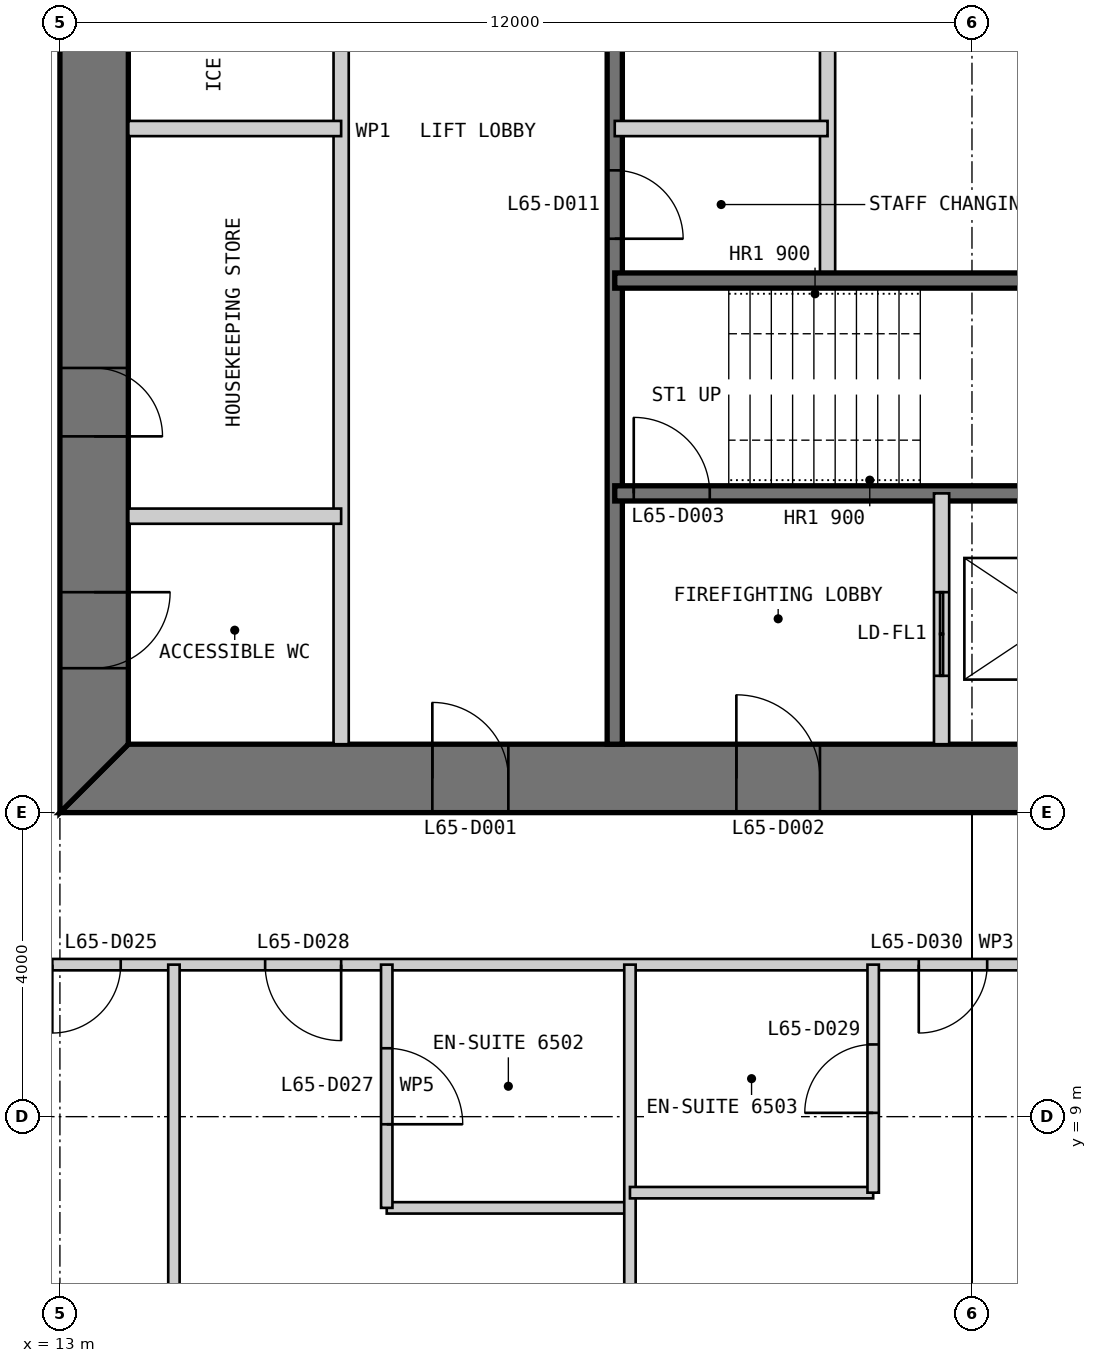
"""IFC4 building model, lengths in metres.
Left out: names, types, materials, properties, quantities, classifications, styles, units other than length and angle.
Written with IfcOpenShell. Run it as: python <this file> out.ifc"""

import sys

from ifc_helpers import new_model, si_unit, direction, frame, frame_2d, origin, place, context, subcontext, project, spatial, polyline, rectangle, outline, extrude, element, fill, save


model = new_model("IFC4")
c1 = context("Model", 3, precision=1e-05, world=origin(), true_north=direction((0.0, 1.0)))
c2 = subcontext(c1, "Body", "Model", "MODEL_VIEW")
j1 = project(units=[si_unit("LENGTHUNIT", "METRE"), si_unit("PLANEANGLEUNIT", "RADIAN")], contexts=[c1])
p1 = place(None, origin())
s1 = spatial("IfcSite", under=j1, at=p1, CompositionType="ELEMENT")
p2 = place(p1, origin())
s2 = spatial("IfcBuilding", under=s1, at=p2, CompositionType="ELEMENT")
p3 = place(p2, frame((0.0, 0.0, 273.0)))
s3 = spatial("IfcBuildingStorey", under=s2, at=p3, CompositionType="ELEMENT", Elevation=273.0)
p4 = place(p3, frame((13.0, 13.45, 0.0), z_axis=(0.0, 0.0, 1.0), x_axis=(1.0, 0.0, 0.0)))
e1 = element("IfcWall", 1, at=p4, inside=s3, PredefinedType="SHEAR", context=c2, shape_type="SweptSolid", body=[
    extrude(outline(polyline([(0.0, -0.45), (24.0, -0.45), (23.1, 0.45), (0.9, 0.45), (0.0, -0.45)])), origin(), (0.0, 0.0, 1.0), 3.4),
])
p5 = place(p4, frame((4.9, 0.0, 0.0)))
e2 = element("IfcOpeningElement", 2, at=p5, cuts=e1, PredefinedType="OPENING", context=c2, shape_type="SweptSolid", body=[
    extrude(rectangle(XDim=1.0, YDim=2.2, at=frame_2d((0.5, 1.1))), frame((0.0, 0.46, 0.0), z_axis=(0.0, -1.0, 0.0), x_axis=(1.0, 0.0, 0.0)), (0.0, 0.0, 1.0), 0.92),
])
p6 = place(p4, frame((8.9, 0.0, 0.0)))
e3 = element("IfcOpeningElement", 3, at=p6, cuts=e1, PredefinedType="OPENING", context=c2, shape_type="SweptSolid", body=[
    extrude(rectangle(XDim=1.1, YDim=2.2, at=frame_2d((0.55, 1.1))), frame((0.0, 0.46, 0.0), z_axis=(0.0, -1.0, 0.0), x_axis=(1.0, 0.0, 0.0)), (0.0, 0.0, 1.0), 0.92),
])
p7 = place(p4, frame((15.05, 0.0, 0.0)))
e4 = element("IfcOpeningElement", 4, at=p7, cuts=e1, PredefinedType="OPENING", context=c2, shape_type="SweptSolid", body=[
    extrude(rectangle(XDim=0.9, YDim=2.2, at=frame_2d((0.45, 1.1))), frame((0.0, 0.46, 0.0), z_axis=(0.0, -1.0, 0.0), x_axis=(1.0, 0.0, 0.0)), (0.0, 0.0, 1.0), 0.92),
])
p8 = place(p4, frame((17.9, 0.0, 0.0)))
e5 = element("IfcOpeningElement", 5, at=p8, cuts=e1, PredefinedType="OPENING", context=c2, shape_type="SweptSolid", body=[
    extrude(rectangle(XDim=1.0, YDim=2.2, at=frame_2d((0.5, 1.1))), frame((0.0, 0.46, 0.0), z_axis=(0.0, -1.0, 0.0), x_axis=(1.0, 0.0, 0.0)), (0.0, 0.0, 1.0), 0.92),
])
p9 = place(p4, frame((21.4, 0.0, 0.0)))
e6 = element("IfcOpeningElement", 6, at=p9, cuts=e1, PredefinedType="OPENING", context=c2, shape_type="SweptSolid", body=[
    extrude(rectangle(XDim=1.0, YDim=2.2, at=frame_2d((0.5, 1.1))), frame((0.0, 0.46, 0.0), z_axis=(0.0, -1.0, 0.0), x_axis=(1.0, 0.0, 0.0)), (0.0, 0.0, 1.0), 0.92),
])
p10 = place(p3, frame((13.45, 36.1, 0.0), z_axis=(0.0, 0.0, 1.0), x_axis=(0.0, -1.0, 0.0)))
e7 = element("IfcWall", 7, at=p10, inside=s3, PredefinedType="SHEAR", context=c2, shape_type="SweptSolid", body=[
    extrude(outline(polyline([(-0.9, -0.45), (23.1, -0.45), (22.2, 0.45), (0.0, 0.45), (-0.9, -0.45)])), origin(), (0.0, 0.0, 1.0), 3.4),
])
p11 = place(p10, frame((20.2, 0.0, 0.0)))
e8 = element("IfcOpeningElement", 8, at=p11, cuts=e7, PredefinedType="OPENING", context=c2, shape_type="SweptSolid", body=[
    extrude(rectangle(XDim=1.0, YDim=2.2, at=frame_2d((0.5, 1.1))), frame((0.0, 0.46, 0.0), z_axis=(0.0, -1.0, 0.0), x_axis=(1.0, 0.0, 0.0)), (0.0, 0.0, 1.0), 0.92),
])
p12 = place(p10, frame((17.25, 0.0, 0.0)))
e9 = element("IfcOpeningElement", 9, at=p12, cuts=e7, PredefinedType="OPENING", context=c2, shape_type="SweptSolid", body=[
    extrude(rectangle(XDim=0.9, YDim=2.2, at=frame_2d((0.45, 1.1))), frame((0.0, 0.46, 0.0), z_axis=(0.0, -1.0, 0.0), x_axis=(1.0, 0.0, 0.0)), (0.0, 0.0, 1.0), 0.92),
])
p13 = place(p3, frame((16.7, 13.9, 0.0), z_axis=(0.0, 0.0, 1.0), x_axis=(0.0, 1.0, 0.0)))
e10 = element("IfcWall", 10, at=p13, inside=s3, PredefinedType="PARTITIONING", context=c2, shape_type="SweptSolid", body=[
    extrude(rectangle(XDim=16.1, YDim=0.2, at=frame_2d((8.05, 0.0))), origin(), (0.0, 0.0, 1.0), 3.2),
])
p14 = place(p13, frame((9.65, 0.0, 0.0)))
e11 = element("IfcOpeningElement", 11, at=p14, cuts=e10, PredefinedType="OPENING", context=c2, shape_type="SweptSolid", body=[
    extrude(rectangle(XDim=0.9, YDim=2.2, at=frame_2d((0.45, 1.1))), frame((0.0, 0.11, 0.0), z_axis=(0.0, -1.0, 0.0), x_axis=(1.0, 0.0, 0.0)), (0.0, 0.0, 1.0), 0.22),
])
p15 = place(p13, frame((13.65, 0.0, 0.0)))
e12 = element("IfcOpeningElement", 12, at=p15, cuts=e10, PredefinedType="OPENING", context=c2, shape_type="SweptSolid", body=[
    extrude(rectangle(XDim=0.9, YDim=2.2, at=frame_2d((0.45, 1.1))), frame((0.0, 0.11, 0.0), z_axis=(0.0, -1.0, 0.0), x_axis=(1.0, 0.0, 0.0)), (0.0, 0.0, 1.0), 0.22),
])
p16 = place(p3, frame((20.3, 13.9, 0.0), z_axis=(0.0, 0.0, 1.0), x_axis=(0.0, 1.0, 0.0)))
e13 = element("IfcWall", 13, at=p16, inside=s3, PredefinedType="SOLIDWALL", context=c2, shape_type="SweptSolid", body=[
    extrude(rectangle(XDim=16.1, YDim=0.2, at=frame_2d((8.05, 0.0))), origin(), (0.0, 0.0, 1.0), 3.2),
])
p17 = place(p16, frame((6.65, 0.0, 0.0)))
e14 = element("IfcOpeningElement", 14, at=p17, cuts=e13, PredefinedType="OPENING", context=c2, shape_type="SweptSolid", body=[
    extrude(rectangle(XDim=0.9, YDim=2.2, at=frame_2d((0.45, 1.1))), frame((0.0, 0.11, 0.0), z_axis=(0.0, -1.0, 0.0), x_axis=(1.0, 0.0, 0.0)), (0.0, 0.0, 1.0), 0.22),
])
p18 = place(p16, frame((9.15, 0.0, 0.0)))
e15 = element("IfcOpeningElement", 15, at=p18, cuts=e13, PredefinedType="OPENING", context=c2, shape_type="SweptSolid", body=[
    extrude(rectangle(XDim=0.9, YDim=2.2, at=frame_2d((0.45, 1.1))), frame((0.0, 0.11, 0.0), z_axis=(0.0, -1.0, 0.0), x_axis=(1.0, 0.0, 0.0)), (0.0, 0.0, 1.0), 0.22),
])
p19 = place(p16, frame((13.15, 0.0, 0.0)))
e16 = element("IfcOpeningElement", 16, at=p19, cuts=e13, PredefinedType="OPENING", context=c2, shape_type="SweptSolid", body=[
    extrude(rectangle(XDim=0.9, YDim=2.2, at=frame_2d((0.45, 1.1))), frame((0.0, 0.11, 0.0), z_axis=(0.0, -1.0, 0.0), x_axis=(1.0, 0.0, 0.0)), (0.0, 0.0, 1.0), 0.22),
])
p20 = place(p3, frame((23.1, 20.0, 0.0), z_axis=(0.0, 0.0, 1.0), x_axis=(0.0, 1.0, 0.0)))
e17 = element("IfcWall", 17, at=p20, inside=s3, PredefinedType="PARTITIONING", context=c2, shape_type="SweptSolid", body=[
    extrude(rectangle(XDim=10.0, YDim=0.2, at=frame_2d((5.0, 0.0))), origin(), (0.0, 0.0, 1.0), 3.2),
])
p21 = place(p3, frame((20.3, 17.2, 0.0), z_axis=(0.0, 0.0, 1.0), x_axis=(1.0, 0.0, 0.0)))
e18 = element("IfcWall", 18, at=p21, inside=s3, PredefinedType="SOLIDWALL", context=c2, shape_type="SweptSolid", body=[
    extrude(rectangle(XDim=9.4, YDim=0.2, at=frame_2d((4.7, 0.0))), origin(), (0.0, 0.0, 1.0), 3.2),
])
p22 = place(p21, frame((0.25, 0.0, 0.0)))
e19 = element("IfcOpeningElement", 19, at=p22, cuts=e18, PredefinedType="OPENING", context=c2, shape_type="SweptSolid", body=[
    extrude(rectangle(XDim=1.0, YDim=2.2, at=frame_2d((0.5, 1.1))), frame((0.0, 0.11, 0.0), z_axis=(0.0, -1.0, 0.0), x_axis=(1.0, 0.0, 0.0)), (0.0, 0.0, 1.0), 0.22),
])
p23 = place(p3, frame((20.3, 20.0, 0.0), z_axis=(0.0, 0.0, 1.0), x_axis=(1.0, 0.0, 0.0)))
e20 = element("IfcWall", 20, at=p23, inside=s3, PredefinedType="SOLIDWALL", context=c2, shape_type="SweptSolid", body=[
    extrude(rectangle(XDim=15.8, YDim=0.2, at=frame_2d((7.9, 0.0))), origin(), (0.0, 0.0, 1.0), 3.2),
])
p24 = place(p3, frame((24.6, 13.9, 0.0), z_axis=(0.0, 0.0, 1.0), x_axis=(0.0, 1.0, 0.0)))
e21 = element("IfcWall", 21, at=p24, inside=s3, PredefinedType="PARTITIONING", context=c2, shape_type="SweptSolid", body=[
    extrude(rectangle(XDim=3.3, YDim=0.2, at=frame_2d((1.65, 0.0))), origin(), (0.0, 0.0, 1.0), 3.2),
])
p25 = place(p24, frame((0.9, 0.0, 0.0)))
e22 = element("IfcOpeningElement", 22, at=p25, cuts=e21, PredefinedType="OPENING", context=c2, shape_type="SweptSolid", body=[
    extrude(rectangle(XDim=1.1, YDim=2.2, at=frame_2d((0.55, 1.1))), frame((0.0, 0.11, 0.0), z_axis=(0.0, -1.0, 0.0), x_axis=(1.0, 0.0, 0.0)), (0.0, 0.0, 1.0), 0.22),
])
for number, where, z_axis, x_axis in (
    (23, (13.9, 16.9, 0.0), (0.0, 0.0, 1.0), (1.0, 0.0, 0.0)),
    (24, (13.9, 22.0, 0.0), (0.0, 0.0, 1.0), (1.0, 0.0, 0.0)),
    (25, (20.3, 22.0, 0.0), (0.0, 0.0, 1.0), (1.0, 0.0, 0.0)),
):
    element("IfcWall", number, at=place(p3, frame(where, z_axis=z_axis, x_axis=x_axis)), inside=s3, PredefinedType="PARTITIONING", context=c2, shape_type="SweptSolid", body=[
        extrude(rectangle(XDim=2.8, YDim=0.2, at=frame_2d((1.4, 0.0))), origin(), (0.0, 0.0, 1.0), 3.2),
    ])
p26 = place(p3, frame((11.0, 11.0, 0.0), z_axis=(0.0, 0.0, 1.0), x_axis=(1.0, 0.0, 0.0)))
e26 = element("IfcWall", 26, at=p26, inside=s3, PredefinedType="PARTITIONING", context=c2, shape_type="SweptSolid", body=[
    extrude(rectangle(XDim=28.0, YDim=0.15, at=frame_2d((14.0, 0.0))), origin(), (0.0, 0.0, 1.0), 2.844),
])
p27 = place(p26, frame((1.9, 0.0, 0.0)))
e27 = element("IfcOpeningElement", 27, at=p27, cuts=e26, PredefinedType="OPENING", context=c2, shape_type="SweptSolid", body=[
    extrude(rectangle(XDim=0.9, YDim=2.1, at=frame_2d((0.45, 1.05))), frame((0.0, 0.085, 0.0), z_axis=(0.0, -1.0, 0.0), x_axis=(1.0, 0.0, 0.0)), (0.0, 0.0, 1.0), 0.17),
])
p28 = place(p26, frame((4.7, 0.0, 0.0)))
e28 = element("IfcOpeningElement", 28, at=p28, cuts=e26, PredefinedType="OPENING", context=c2, shape_type="SweptSolid", body=[
    extrude(rectangle(XDim=1.0, YDim=2.1, at=frame_2d((0.5, 1.05))), frame((0.0, 0.085, 0.0), z_axis=(0.0, -1.0, 0.0), x_axis=(1.0, 0.0, 0.0)), (0.0, 0.0, 1.0), 0.17),
])
p29 = place(p26, frame((13.3, 0.0, 0.0)))
e29 = element("IfcOpeningElement", 29, at=p29, cuts=e26, PredefinedType="OPENING", context=c2, shape_type="SweptSolid", body=[
    extrude(rectangle(XDim=0.9, YDim=2.1, at=frame_2d((0.45, 1.05))), frame((0.0, 0.085, 0.0), z_axis=(0.0, -1.0, 0.0), x_axis=(1.0, 0.0, 0.0)), (0.0, 0.0, 1.0), 0.17),
])
p30 = place(p26, frame((24.9, 0.0, 0.0)))
e30 = element("IfcOpeningElement", 30, at=p30, cuts=e26, PredefinedType="OPENING", context=c2, shape_type="SweptSolid", body=[
    extrude(rectangle(XDim=0.9, YDim=2.1, at=frame_2d((0.45, 1.05))), frame((0.0, 0.085, 0.0), z_axis=(0.0, -1.0, 0.0), x_axis=(1.0, 0.0, 0.0)), (0.0, 0.0, 1.0), 0.17),
])
p31 = place(p3, frame((14.5, 0.15, 0.0), z_axis=(0.0, 0.0, 1.0), x_axis=(0.0, 1.0, 0.0)))
e31 = element("IfcWall", 31, at=p31, inside=s3, PredefinedType="PARTITIONING", context=c2, shape_type="SweptSolid", body=[
    extrude(rectangle(XDim=10.85, YDim=0.15, at=frame_2d((5.425, 0.0))), origin(), (0.0, 0.0, 1.0), 3.25),
])
p32 = place(p3, frame((17.3, 7.8, 0.0), z_axis=(0.0, 0.0, 1.0), x_axis=(1.0, 0.0, 0.0)))
e32 = element("IfcWall", 32, at=p32, inside=s3, PredefinedType="PARTITIONING", context=c2, shape_type="SweptSolid", body=[
    extrude(rectangle(XDim=3.2, YDim=0.15, at=frame_2d((1.6, 0.0))), origin(), (0.0, 0.0, 1.0), 3.25),
])
p33 = place(p3, frame((17.3, 7.8, 0.0), z_axis=(0.0, 0.0, 1.0), x_axis=(0.0, 1.0, 0.0)))
e33 = element("IfcWall", 33, at=p33, inside=s3, PredefinedType="PARTITIONING", context=c2, shape_type="SweptSolid", body=[
    extrude(rectangle(XDim=3.2, YDim=0.15, at=frame_2d((1.6, 0.0))), origin(), (0.0, 0.0, 1.0), 3.25),
])
p34 = place(p33, frame((1.1, 0.0, 0.0)))
e34 = element("IfcOpeningElement", 34, at=p34, cuts=e33, PredefinedType="OPENING", context=c2, shape_type="SweptSolid", body=[
    extrude(rectangle(XDim=1.0, YDim=2.1, at=frame_2d((0.5, 1.05))), frame((0.0, 0.085, 0.0), z_axis=(0.0, -1.0, 0.0), x_axis=(1.0, 0.0, 0.0)), (0.0, 0.0, 1.0), 0.17),
])
p35 = place(p3, frame((20.5, 0.15, 0.0), z_axis=(0.0, 0.0, 1.0), x_axis=(0.0, 1.0, 0.0)))
e35 = element("IfcWall", 35, at=p35, inside=s3, PredefinedType="PARTITIONING", context=c2, shape_type="SweptSolid", body=[
    extrude(rectangle(XDim=10.85, YDim=0.15, at=frame_2d((5.425, 0.0))), origin(), (0.0, 0.0, 1.0), 3.25),
])
p36 = place(p3, frame((20.5, 8.0, 0.0), z_axis=(0.0, 0.0, 1.0), x_axis=(1.0, 0.0, 0.0)))
e36 = element("IfcWall", 36, at=p36, inside=s3, PredefinedType="PARTITIONING", context=c2, shape_type="SweptSolid", body=[
    extrude(rectangle(XDim=3.2, YDim=0.15, at=frame_2d((1.6, 0.0))), origin(), (0.0, 0.0, 1.0), 3.25),
])
p37 = place(p3, frame((23.7, 8.0, 0.0), z_axis=(0.0, 0.0, 1.0), x_axis=(0.0, 1.0, 0.0)))
e37 = element("IfcWall", 37, at=p37, inside=s3, PredefinedType="PARTITIONING", context=c2, shape_type="SweptSolid", body=[
    extrude(rectangle(XDim=3.0, YDim=0.15, at=frame_2d((1.5, 0.0))), origin(), (0.0, 0.0, 1.0), 3.25),
])
p38 = place(p37, frame((1.05, 0.0, 0.0)))
e38 = element("IfcOpeningElement", 38, at=p38, cuts=e37, PredefinedType="OPENING", context=c2, shape_type="SweptSolid", body=[
    extrude(rectangle(XDim=0.9, YDim=2.1, at=frame_2d((0.45, 1.05))), frame((0.0, 0.085, 0.0), z_axis=(0.0, -1.0, 0.0), x_axis=(1.0, 0.0, 0.0)), (0.0, 0.0, 1.0), 0.17),
])
p39 = place(p5, origin())
e39 = element("IfcDoor", 39, at=p39, inside=s3, OperationType="SINGLE_SWING_LEFT", PredefinedType="DOOR", context=c2, shape_type="SweptSolid", body=[
    extrude(rectangle(XDim=1.0, YDim=2.2, at=frame_2d((0.5, 1.1))), frame((0.0, 0.025, 0.0), z_axis=(0.0, -1.0, 0.0), x_axis=(1.0, 0.0, 0.0)), (0.0, 0.0, 1.0), 0.05),
    extrude(outline(polyline([(0.0, 0.0), (0.04, 0.0), (0.04, 2.16), (0.96, 2.16), (0.96, 0.0), (1.0, 0.0), (1.0, 2.2), (0.0, 2.2), (0.0, 0.0)])), frame((0.0, 0.3, 0.0), z_axis=(0.0, -1.0, 0.0), x_axis=(1.0, 0.0, 0.0)), (0.0, 0.0, 1.0), 0.6),
])
fill(e2, e39)
p40 = place(p6, origin())
e40 = element("IfcDoor", 40, at=p40, inside=s3, OperationType="SINGLE_SWING_LEFT", PredefinedType="DOOR", context=c2, shape_type="SweptSolid", body=[
    extrude(rectangle(XDim=1.1, YDim=2.2, at=frame_2d((0.55, 1.1))), frame((0.0, 0.025, 0.0), z_axis=(0.0, -1.0, 0.0), x_axis=(1.0, 0.0, 0.0)), (0.0, 0.0, 1.0), 0.05),
    extrude(outline(polyline([(0.0, 0.0), (0.04, 0.0), (0.04, 2.16), (1.06, 2.16), (1.06, 0.0), (1.1, 0.0), (1.1, 2.2), (0.0, 2.2), (0.0, 0.0)])), frame((0.0, 0.3, 0.0), z_axis=(0.0, -1.0, 0.0), x_axis=(1.0, 0.0, 0.0)), (0.0, 0.0, 1.0), 0.6),
])
fill(e3, e40)
p41 = place(p22, origin())
e41 = element("IfcDoor", 41, at=p41, inside=s3, OperationType="SINGLE_SWING_LEFT", PredefinedType="DOOR", context=c2, shape_type="SweptSolid", body=[
    extrude(rectangle(XDim=1.0, YDim=2.2, at=frame_2d((0.5, 1.1))), frame((0.0, 0.025, 0.0), z_axis=(0.0, -1.0, 0.0), x_axis=(1.0, 0.0, 0.0)), (0.0, 0.0, 1.0), 0.05),
])
fill(e19, e41)
p42 = place(p11, origin())
e42 = element("IfcDoor", 42, at=p42, inside=s3, OperationType="SINGLE_SWING_LEFT", PredefinedType="DOOR", context=c2, shape_type="SweptSolid", body=[
    extrude(rectangle(XDim=1.0, YDim=2.2, at=frame_2d((0.5, 1.1))), frame((0.0, 0.025, 0.0), z_axis=(0.0, -1.0, 0.0), x_axis=(1.0, 0.0, 0.0)), (0.0, 0.0, 1.0), 0.05),
    extrude(outline(polyline([(0.0, 0.0), (0.04, 0.0), (0.04, 2.16), (0.96, 2.16), (0.96, 0.0), (1.0, 0.0), (1.0, 2.2), (0.0, 2.2), (0.0, 0.0)])), frame((0.0, 0.3, 0.0), z_axis=(0.0, -1.0, 0.0), x_axis=(1.0, 0.0, 0.0)), (0.0, 0.0, 1.0), 0.6),
])
fill(e8, e42)
p43 = place(p12, origin())
e43 = element("IfcDoor", 43, at=p43, inside=s3, OperationType="SINGLE_SWING_RIGHT", PredefinedType="DOOR", context=c2, shape_type="SweptSolid", body=[
    extrude(rectangle(XDim=0.9, YDim=2.2, at=frame_2d((0.45, 1.1))), frame((0.0, 0.025, 0.0), z_axis=(0.0, -1.0, 0.0), x_axis=(1.0, 0.0, 0.0)), (0.0, 0.0, 1.0), 0.05),
    extrude(outline(polyline([(0.0, 0.0), (0.04, 0.0), (0.04, 2.16), (0.86, 2.16), (0.86, 0.0), (0.9, 0.0), (0.9, 2.2), (0.0, 2.2), (0.0, 0.0)])), frame((0.0, 0.3, 0.0), z_axis=(0.0, -1.0, 0.0), x_axis=(1.0, 0.0, 0.0)), (0.0, 0.0, 1.0), 0.6),
])
fill(e9, e43)
p44 = place(p17, frame((0.9, 0.0, 0.0), z_axis=(0.0, 0.0, 1.0), x_axis=(-1.0, 0.0, 0.0)))
e44 = element("IfcDoor", 44, at=p44, inside=s3, OperationType="SINGLE_SWING_RIGHT", PredefinedType="DOOR", context=c2, shape_type="SweptSolid", body=[
    extrude(rectangle(XDim=0.9, YDim=2.2, at=frame_2d((0.45, 1.1))), frame((0.0, 0.025, 0.0), z_axis=(0.0, -1.0, 0.0), x_axis=(1.0, 0.0, 0.0)), (0.0, 0.0, 1.0), 0.05),
])
fill(e14, e44)
p45 = place(p27, frame((0.9, 0.0, 0.0), z_axis=(0.0, 0.0, 1.0), x_axis=(-1.0, 0.0, 0.0)))
e45 = element("IfcDoor", 45, at=p45, inside=s3, OperationType="SINGLE_SWING_RIGHT", PredefinedType="DOOR", context=c2, shape_type="SweptSolid", body=[
    extrude(rectangle(XDim=0.9, YDim=2.1, at=frame_2d((0.45, 1.05))), frame((0.0, 0.025, 0.0), z_axis=(0.0, -1.0, 0.0), x_axis=(1.0, 0.0, 0.0)), (0.0, 0.0, 1.0), 0.05),
])
fill(e27, e45)
p46 = place(p34, frame((1.0, 0.0, 0.0), z_axis=(0.0, 0.0, 1.0), x_axis=(-1.0, 0.0, 0.0)))
e46 = element("IfcDoor", 46, at=p46, inside=s3, OperationType="SINGLE_SWING_RIGHT", PredefinedType="DOOR", context=c2, shape_type="SweptSolid", body=[
    extrude(rectangle(XDim=1.0, YDim=2.1, at=frame_2d((0.5, 1.05))), frame((0.0, 0.025, 0.0), z_axis=(0.0, -1.0, 0.0), x_axis=(1.0, 0.0, 0.0)), (0.0, 0.0, 1.0), 0.05),
])
fill(e34, e46)
p47 = place(p28, frame((1.0, 0.0, 0.0), z_axis=(0.0, 0.0, 1.0), x_axis=(-1.0, 0.0, 0.0)))
e47 = element("IfcDoor", 47, at=p47, inside=s3, OperationType="SINGLE_SWING_LEFT", PredefinedType="DOOR", context=c2, shape_type="SweptSolid", body=[
    extrude(rectangle(XDim=1.0, YDim=2.1, at=frame_2d((0.5, 1.05))), frame((0.0, 0.025, 0.0), z_axis=(0.0, -1.0, 0.0), x_axis=(1.0, 0.0, 0.0)), (0.0, 0.0, 1.0), 0.05),
])
fill(e28, e47)
p48 = place(p38, origin())
e48 = element("IfcDoor", 48, at=p48, inside=s3, OperationType="SINGLE_SWING_LEFT", PredefinedType="DOOR", context=c2, shape_type="SweptSolid", body=[
    extrude(rectangle(XDim=0.9, YDim=2.1, at=frame_2d((0.45, 1.05))), frame((0.0, 0.025, 0.0), z_axis=(0.0, -1.0, 0.0), x_axis=(1.0, 0.0, 0.0)), (0.0, 0.0, 1.0), 0.05),
])
fill(e38, e48)
p49 = place(p29, frame((0.9, 0.0, 0.0), z_axis=(0.0, 0.0, 1.0), x_axis=(-1.0, 0.0, 0.0)))
e49 = element("IfcDoor", 49, at=p49, inside=s3, OperationType="SINGLE_SWING_RIGHT", PredefinedType="DOOR", context=c2, shape_type="SweptSolid", body=[
    extrude(rectangle(XDim=0.9, YDim=2.1, at=frame_2d((0.45, 1.05))), frame((0.0, 0.025, 0.0), z_axis=(0.0, -1.0, 0.0), x_axis=(1.0, 0.0, 0.0)), (0.0, 0.0, 1.0), 0.05),
])
fill(e29, e49)
p50 = place(p25, origin())
e50 = element("IfcDoor", 50, at=p50, inside=s3, OperationType="DOUBLE_DOOR_SLIDING", PredefinedType="DOOR", context=c2, shape_type="SweptSolid", body=[
    extrude(rectangle(XDim=1.1, YDim=2.2, at=frame_2d((0.55, 1.1))), frame((0.0, 0.025, 0.0), z_axis=(0.0, -1.0, 0.0), x_axis=(1.0, 0.0, 0.0)), (0.0, 0.0, 1.0), 0.05),
])
fill(e22, e50)
save(model, sys.argv[1])
